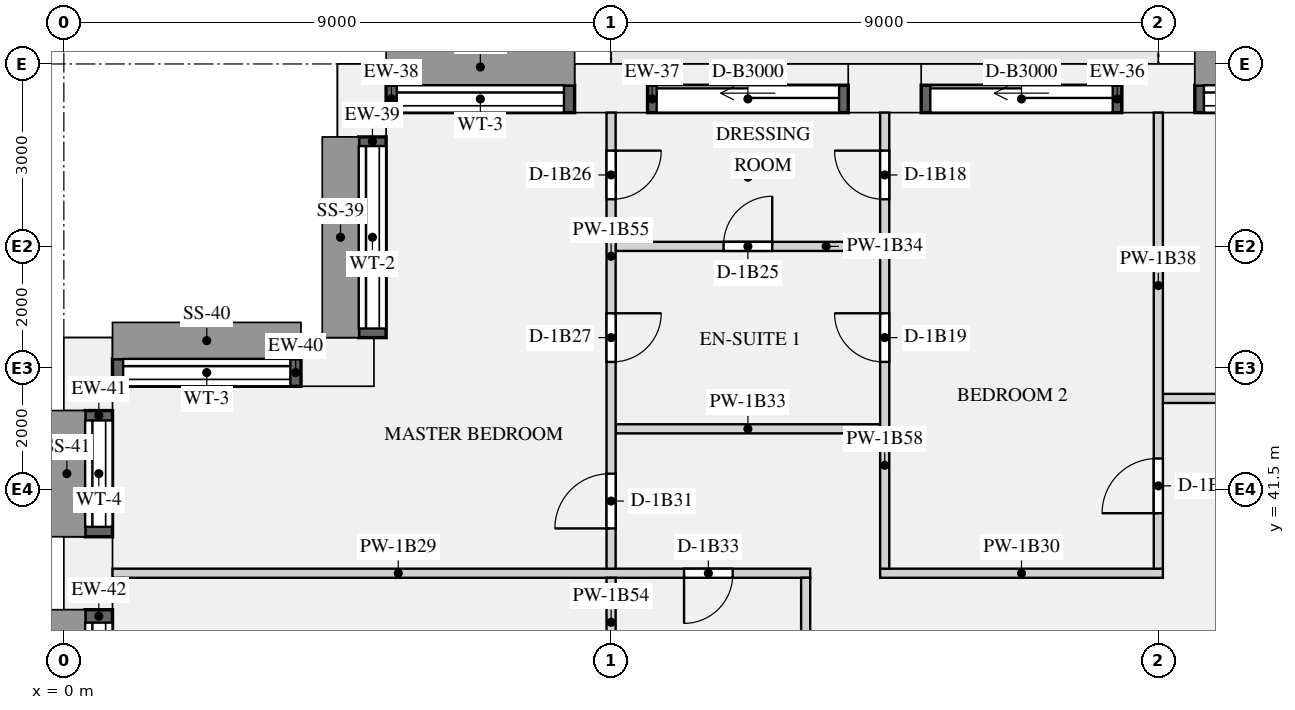
"""IFC4 building model, lengths in metres.
Left out: names, types, materials, properties, quantities, classifications, styles, units other than length and angle.
Written with IfcOpenShell. Run it as: python <this file> out.ifc"""

import sys

from ifc_helpers import new_model, si_unit, direction, frame, frame_2d, origin, origin_2d, place, context, subcontext, project, spatial, rectangle, extrude, element, fill, save


model = new_model("IFC4")
c1 = context("Model", 3, precision=1e-05, world=origin(), true_north=direction((0.0, 1.0)))
c2 = subcontext(c1, "Body", "Model", "MODEL_VIEW")
j1 = project(units=[si_unit("LENGTHUNIT", "METRE"), si_unit("PLANEANGLEUNIT", "RADIAN")], contexts=[c1])
p1 = place(None, origin())
s1 = spatial("IfcSite", under=j1, at=p1, CompositionType="ELEMENT")
p2 = place(p1, origin())
s2 = spatial("IfcBuilding", under=s1, at=p2, CompositionType="ELEMENT")
p3 = place(p2, frame((0.0, 0.0, 28.95)))
s3 = spatial("IfcBuildingStorey", under=s2, at=p3, CompositionType="ELEMENT", Elevation=28.95)
for number, where, z_axis, x_axis in (
    (1, (18.0, 48.1, 0.0), (0.0, 0.0, 1.0), (-1.0, 0.0, 0.0)),
    (2, (13.5, 48.1, 0.0), (0.0, 0.0, 1.0), (-1.0, 0.0, 0.0)),
    (3, (9.0, 48.1, 0.0), (0.0, 0.0, 1.0), (-1.0, 0.0, 0.0)),
    (4, (4.9, 47.9, 0.0), (0.0, 0.0, 1.0), (0.0, -1.0, 0.0)),
    (5, (4.5, 43.6, 0.0), (0.0, 0.0, 1.0), (-1.0, 0.0, 0.0)),
    (6, (0.4, 43.4, 0.0), (0.0, 0.0, 1.0), (0.0, -1.0, 0.0)),
    (7, (0.4, 40.125, 0.0), (0.0, 0.0, 1.0), (0.0, -1.0, 0.0)),
):
    element("IfcColumn", number, at=place(p3, frame(where, z_axis=z_axis, x_axis=x_axis)), inside=s3, PredefinedType="USERDEFINED", context=c2, shape_type="SweptSolid", body=[
        extrude(rectangle(XDim=1.2, YDim=0.8, at=origin_2d()), origin(), (0.0, 0.0, 1.0), 3.15),
    ])
p4 = place(p3, frame((21.9, 47.925, 0.9), z_axis=(0.0, 0.0, 1.0), x_axis=(-1.0, 0.0, 0.0)))
e8 = element("IfcWall", 8, at=p4, inside=s3, PredefinedType="SOLIDWALL", context=c2, shape_type="SweptSolid", body=[
    extrude(rectangle(XDim=3.3, YDim=0.45, at=frame_2d((1.65, 0.0))), origin(), (0.0, 0.0, 1.0), 1.93),
])
p5 = place(p4, frame((0.15, 0.0, 0.15)))
e9 = element("IfcOpeningElement", 9, at=p5, cuts=e8, PredefinedType="OPENING", context=c2, shape_type="SweptSolid", body=[
    extrude(rectangle(XDim=3.0, YDim=1.5, at=frame_2d((1.5, 0.75))), frame((0.0, 0.235, 0.0), z_axis=(0.0, -1.0, 0.0), x_axis=(1.0, 0.0, 0.0)), (0.0, 0.0, 1.0), 0.47),
])
p6 = place(p3, frame((17.4, 47.925, 0.0), z_axis=(0.0, 0.0, 1.0), x_axis=(-1.0, 0.0, 0.0)))
e10 = element("IfcWall", 10, at=p6, inside=s3, PredefinedType="SOLIDWALL", context=c2, shape_type="SweptSolid", body=[
    extrude(rectangle(XDim=3.3, YDim=0.45, at=frame_2d((1.65, 0.0))), origin(), (0.0, 0.0, 1.0), 2.83),
])
p7 = place(p6, frame((0.15, 0.0, 0.0)))
e11 = element("IfcOpeningElement", 11, at=p7, cuts=e10, PredefinedType="OPENING", context=c2, shape_type="SweptSolid", body=[
    extrude(rectangle(XDim=3.0, YDim=2.3, at=frame_2d((1.5, 1.15))), frame((0.0, 0.235, 0.0), z_axis=(0.0, -1.0, 0.0), x_axis=(1.0, 0.0, 0.0)), (0.0, 0.0, 1.0), 0.47),
])
p8 = place(p3, frame((12.9, 47.925, 0.0), z_axis=(0.0, 0.0, 1.0), x_axis=(-1.0, 0.0, 0.0)))
e12 = element("IfcWall", 12, at=p8, inside=s3, PredefinedType="SOLIDWALL", context=c2, shape_type="SweptSolid", body=[
    extrude(rectangle(XDim=3.3, YDim=0.45, at=frame_2d((1.65, 0.0))), origin(), (0.0, 0.0, 1.0), 2.83),
])
p9 = place(p8, frame((0.15, 0.0, 0.0)))
e13 = element("IfcOpeningElement", 13, at=p9, cuts=e12, PredefinedType="OPENING", context=c2, shape_type="SweptSolid", body=[
    extrude(rectangle(XDim=3.0, YDim=2.3, at=frame_2d((1.5, 1.15))), frame((0.0, 0.235, 0.0), z_axis=(0.0, -1.0, 0.0), x_axis=(1.0, 0.0, 0.0)), (0.0, 0.0, 1.0), 0.47),
])
p10 = place(p3, frame((8.4, 47.925, 0.9), z_axis=(0.0, 0.0, 1.0), x_axis=(-1.0, 0.0, 0.0)))
e14 = element("IfcWall", 14, at=p10, inside=s3, PredefinedType="SOLIDWALL", context=c2, shape_type="SweptSolid", body=[
    extrude(rectangle(XDim=3.1, YDim=0.45, at=frame_2d((1.55, 0.0))), origin(), (0.0, 0.0, 1.0), 1.93),
])
p11 = place(p10, frame((0.175, 0.0, 0.15)))
e15 = element("IfcOpeningElement", 15, at=p11, cuts=e14, PredefinedType="OPENING", context=c2, shape_type="SweptSolid", body=[
    extrude(rectangle(XDim=2.75, YDim=1.5, at=frame_2d((1.375, 0.75))), frame((0.0, 0.235, 0.0), z_axis=(0.0, -1.0, 0.0), x_axis=(1.0, 0.0, 0.0)), (0.0, 0.0, 1.0), 0.47),
])
p12 = place(p3, frame((5.075, 47.3, 0.9), z_axis=(0.0, 0.0, 1.0), x_axis=(0.0, -1.0, 0.0)))
e16 = element("IfcWall", 16, at=p12, inside=s3, PredefinedType="SOLIDWALL", context=c2, shape_type="SweptSolid", body=[
    extrude(rectangle(XDim=3.3, YDim=0.45, at=frame_2d((1.65, 0.0))), origin(), (0.0, 0.0, 1.0), 1.93),
])
p13 = place(p12, frame((0.15, 0.0, 0.15)))
e17 = element("IfcOpeningElement", 17, at=p13, cuts=e16, PredefinedType="OPENING", context=c2, shape_type="SweptSolid", body=[
    extrude(rectangle(XDim=3.0, YDim=1.5, at=frame_2d((1.5, 0.75))), frame((0.0, 0.235, 0.0), z_axis=(0.0, -1.0, 0.0), x_axis=(1.0, 0.0, 0.0)), (0.0, 0.0, 1.0), 0.47),
])
p14 = place(p3, frame((3.9, 43.425, 0.9), z_axis=(0.0, 0.0, 1.0), x_axis=(-1.0, 0.0, 0.0)))
e18 = element("IfcWall", 18, at=p14, inside=s3, PredefinedType="SOLIDWALL", context=c2, shape_type="SweptSolid", body=[
    extrude(rectangle(XDim=3.1, YDim=0.45, at=frame_2d((1.55, 0.0))), origin(), (0.0, 0.0, 1.0), 1.93),
])
p15 = place(p14, frame((0.175, 0.0, 0.15)))
e19 = element("IfcOpeningElement", 19, at=p15, cuts=e18, PredefinedType="OPENING", context=c2, shape_type="SweptSolid", body=[
    extrude(rectangle(XDim=2.75, YDim=1.5, at=frame_2d((1.375, 0.75))), frame((0.0, 0.235, 0.0), z_axis=(0.0, -1.0, 0.0), x_axis=(1.0, 0.0, 0.0)), (0.0, 0.0, 1.0), 0.47),
])
p16 = place(p3, frame((0.575, 42.8, 0.9), z_axis=(0.0, 0.0, 1.0), x_axis=(0.0, -1.0, 0.0)))
e20 = element("IfcWall", 20, at=p16, inside=s3, PredefinedType="SOLIDWALL", context=c2, shape_type="SweptSolid", body=[
    extrude(rectangle(XDim=2.075, YDim=0.45, at=frame_2d((1.038, 0.0))), origin(), (0.0, 0.0, 1.0), 1.93),
])
p17 = place(p16, frame((0.163, 0.0, 0.15)))
e21 = element("IfcOpeningElement", 21, at=p17, cuts=e20, PredefinedType="OPENING", context=c2, shape_type="SweptSolid", body=[
    extrude(rectangle(XDim=1.75, YDim=1.5, at=frame_2d((0.875, 0.75))), frame((0.0, 0.235, 0.0), z_axis=(0.0, -1.0, 0.0), x_axis=(1.0, 0.0, 0.0)), (0.0, 0.0, 1.0), 0.47),
])
p18 = place(p3, frame((0.575, 39.525, 0.9), z_axis=(0.0, 0.0, 1.0), x_axis=(0.0, -1.0, 0.0)))
e22 = element("IfcWall", 22, at=p18, inside=s3, PredefinedType="SOLIDWALL", context=c2, shape_type="SweptSolid", body=[
    extrude(rectangle(XDim=2.675, YDim=0.45, at=frame_2d((1.337, 0.0))), origin(), (0.0, 0.0, 1.0), 1.93),
])
p19 = place(p18, frame((0.212, 0.0, 0.15)))
e23 = element("IfcOpeningElement", 23, at=p19, cuts=e22, PredefinedType="OPENING", context=c2, shape_type="SweptSolid", body=[
    extrude(rectangle(XDim=2.25, YDim=1.5, at=frame_2d((1.125, 0.75))), frame((0.0, 0.235, 0.0), z_axis=(0.0, -1.0, 0.0), x_axis=(1.0, 0.0, 0.0)), (0.0, 0.0, 1.0), 0.47),
])
p20 = place(p3, frame((18.075, 43.0, 0.0), z_axis=(0.0, 0.0, 1.0), x_axis=(1.0, 0.0, 0.0)))
e24 = element("IfcWall", 24, at=p20, inside=s3, PredefinedType="PARTITIONING", context=c2, shape_type="SweptSolid", body=[
    extrude(rectangle(XDim=31.35, YDim=0.15, at=frame_2d((15.675, 0.0))), origin(), (0.0, 0.0, 1.0), 2.83),
])
p21 = place(p20, frame((17.175, 0.0, 0.0)))
e25 = element("IfcOpeningElement", 25, at=p21, cuts=e24, PredefinedType="OPENING", context=c2, shape_type="SweptSolid", body=[
    extrude(rectangle(XDim=1.5, YDim=2.1, at=frame_2d((0.75, 1.05))), frame((0.0, 0.085, 0.0), z_axis=(0.0, -1.0, 0.0), x_axis=(1.0, 0.0, 0.0)), (0.0, 0.0, 1.0), 0.17),
])
p22 = place(p20, frame((11.475, 0.0, 0.0)))
e26 = element("IfcOpeningElement", 26, at=p22, cuts=e24, PredefinedType="OPENING", context=c2, shape_type="SweptSolid", body=[
    extrude(rectangle(XDim=0.9, YDim=2.1, at=frame_2d((0.45, 1.05))), frame((0.0, 0.085, 0.0), z_axis=(0.0, -1.0, 0.0), x_axis=(1.0, 0.0, 0.0)), (0.0, 0.0, 1.0), 0.17),
])
p23 = place(p20, frame((2.475, 0.0, 0.0)))
e27 = element("IfcOpeningElement", 27, at=p23, cuts=e24, PredefinedType="OPENING", context=c2, shape_type="SweptSolid", body=[
    extrude(rectangle(XDim=0.9, YDim=2.1, at=frame_2d((0.45, 1.05))), frame((0.0, 0.085, 0.0), z_axis=(0.0, -1.0, 0.0), x_axis=(1.0, 0.0, 0.0)), (0.0, 0.0, 1.0), 0.17),
])
p24 = place(p20, frame((24.225, 0.0, 0.0)))
e28 = element("IfcOpeningElement", 28, at=p24, cuts=e24, PredefinedType="OPENING", context=c2, shape_type="SweptSolid", body=[
    extrude(rectangle(XDim=0.9, YDim=2.1, at=frame_2d((0.45, 1.05))), frame((0.0, 0.085, 0.0), z_axis=(0.0, -1.0, 0.0), x_axis=(1.0, 0.0, 0.0)), (0.0, 0.0, 1.0), 0.17),
])
p25 = place(p20, frame((28.725, 0.0, 0.0)))
e29 = element("IfcOpeningElement", 29, at=p25, cuts=e24, PredefinedType="OPENING", context=c2, shape_type="SweptSolid", body=[
    extrude(rectangle(XDim=0.9, YDim=2.1, at=frame_2d((0.45, 1.05))), frame((0.0, 0.085, 0.0), z_axis=(0.0, -1.0, 0.0), x_axis=(1.0, 0.0, 0.0)), (0.0, 0.0, 1.0), 0.17),
])
p26 = place(p3, frame((0.8, 40.125, 0.0), z_axis=(0.0, 0.0, 1.0), x_axis=(1.0, 0.0, 0.0)))
e30 = element("IfcWall", 30, at=p26, inside=s3, PredefinedType="PARTITIONING", context=c2, shape_type="SweptSolid", body=[
    extrude(rectangle(XDim=11.475, YDim=0.15, at=frame_2d((5.737, 0.0))), origin(), (0.0, 0.0, 1.0), 2.83),
])
p27 = place(p26, frame((9.4, 0.0, 0.0)))
e31 = element("IfcOpeningElement", 31, at=p27, cuts=e30, PredefinedType="OPENING", context=c2, shape_type="SweptSolid", body=[
    extrude(rectangle(XDim=0.8, YDim=2.1, at=frame_2d((0.4, 1.05))), frame((0.0, 0.085, 0.0), z_axis=(0.0, -1.0, 0.0), x_axis=(1.0, 0.0, 0.0)), (0.0, 0.0, 1.0), 0.17),
])
p28 = place(p3, frame((13.425, 40.125, 0.0), z_axis=(0.0, 0.0, 1.0), x_axis=(1.0, 0.0, 0.0)))
e32 = element("IfcWall", 32, at=p28, inside=s3, PredefinedType="PARTITIONING", context=c2, shape_type="SweptSolid", body=[
    extrude(rectangle(XDim=4.65, YDim=0.15, at=frame_2d((2.325, 0.0))), origin(), (0.0, 0.0, 1.0), 2.83),
])
p29 = place(p3, frame((9.075, 42.5, 0.0), z_axis=(0.0, 0.0, 1.0), x_axis=(1.0, 0.0, 0.0)))
e33 = element("IfcWall", 33, at=p29, inside=s3, PredefinedType="PARTITIONING", context=c2, shape_type="SweptSolid", body=[
    extrude(rectangle(XDim=4.35, YDim=0.15, at=frame_2d((2.175, 0.0))), origin(), (0.0, 0.0, 1.0), 2.83),
])
p30 = place(p3, frame((9.075, 45.5, 0.0), z_axis=(0.0, 0.0, 1.0), x_axis=(1.0, 0.0, 0.0)))
e34 = element("IfcWall", 34, at=p30, inside=s3, PredefinedType="PARTITIONING", context=c2, shape_type="SweptSolid", body=[
    extrude(rectangle(XDim=4.35, YDim=0.15, at=frame_2d((2.175, 0.0))), origin(), (0.0, 0.0, 1.0), 2.83),
])
p31 = place(p30, frame((1.775, 0.0, 0.0)))
e35 = element("IfcOpeningElement", 35, at=p31, cuts=e34, PredefinedType="OPENING", context=c2, shape_type="SweptSolid", body=[
    extrude(rectangle(XDim=0.8, YDim=2.1, at=frame_2d((0.4, 1.05))), frame((0.0, 0.085, 0.0), z_axis=(0.0, -1.0, 0.0), x_axis=(1.0, 0.0, 0.0)), (0.0, 0.0, 1.0), 0.17),
])
p32 = place(p3, frame((18.0, 40.2, 0.0), z_axis=(0.0, 0.0, 1.0), x_axis=(0.0, 1.0, 0.0)))
e36 = element("IfcWall", 36, at=p32, inside=s3, PredefinedType="PARTITIONING", context=c2, shape_type="SweptSolid", body=[
    extrude(rectangle(XDim=7.5, YDim=0.15, at=frame_2d((3.75, 0.0))), origin(), (0.0, 0.0, 1.0), 2.83),
])
p33 = place(p32, frame((0.912, 0.0, 0.0)))
e37 = element("IfcOpeningElement", 37, at=p33, cuts=e36, PredefinedType="OPENING", context=c2, shape_type="SweptSolid", body=[
    extrude(rectangle(XDim=0.9, YDim=2.1, at=frame_2d((0.45, 1.05))), frame((0.0, 0.085, 0.0), z_axis=(0.0, -1.0, 0.0), x_axis=(1.0, 0.0, 0.0)), (0.0, 0.0, 1.0), 0.17),
])
p34 = place(p3, frame((9.0, 36.35, 0.0), z_axis=(0.0, 0.0, 1.0), x_axis=(0.0, 1.0, 0.0)))
e38 = element("IfcWall", 38, at=p34, inside=s3, PredefinedType="PARTITIONING", context=c2, shape_type="SweptSolid", body=[
    extrude(rectangle(XDim=3.7, YDim=0.15, at=frame_2d((1.85, 0.0))), origin(), (0.0, 0.0, 1.0), 2.83),
])
p35 = place(p34, frame((1.438, 0.0, 0.0)))
e39 = element("IfcOpeningElement", 39, at=p35, cuts=e38, PredefinedType="OPENING", context=c2, shape_type="SweptSolid", body=[
    extrude(rectangle(XDim=0.8, YDim=2.1, at=frame_2d((0.4, 1.05))), frame((0.0, 0.085, 0.0), z_axis=(0.0, -1.0, 0.0), x_axis=(1.0, 0.0, 0.0)), (0.0, 0.0, 1.0), 0.17),
])
p36 = place(p3, frame((9.0, 40.2, 0.0), z_axis=(0.0, 0.0, 1.0), x_axis=(0.0, 1.0, 0.0)))
e40 = element("IfcWall", 40, at=p36, inside=s3, PredefinedType="PARTITIONING", context=c2, shape_type="SweptSolid", body=[
    extrude(rectangle(XDim=7.5, YDim=0.15, at=frame_2d((3.75, 0.0))), origin(), (0.0, 0.0, 1.0), 2.83),
])
p37 = place(p36, frame((6.075, 0.0, 0.0)))
e41 = element("IfcOpeningElement", 41, at=p37, cuts=e40, PredefinedType="OPENING", context=c2, shape_type="SweptSolid", body=[
    extrude(rectangle(XDim=0.8, YDim=2.1, at=frame_2d((0.4, 1.05))), frame((0.0, 0.085, 0.0), z_axis=(0.0, -1.0, 0.0), x_axis=(1.0, 0.0, 0.0)), (0.0, 0.0, 1.0), 0.17),
])
p38 = place(p36, frame((3.4, 0.0, 0.0)))
e42 = element("IfcOpeningElement", 42, at=p38, cuts=e40, PredefinedType="OPENING", context=c2, shape_type="SweptSolid", body=[
    extrude(rectangle(XDim=0.8, YDim=2.1, at=frame_2d((0.4, 1.05))), frame((0.0, 0.085, 0.0), z_axis=(0.0, -1.0, 0.0), x_axis=(1.0, 0.0, 0.0)), (0.0, 0.0, 1.0), 0.17),
])
p39 = place(p36, frame((0.662, 0.0, 0.0)))
e43 = element("IfcOpeningElement", 43, at=p39, cuts=e40, PredefinedType="OPENING", context=c2, shape_type="SweptSolid", body=[
    extrude(rectangle(XDim=0.9, YDim=2.1, at=frame_2d((0.45, 1.05))), frame((0.0, 0.085, 0.0), z_axis=(0.0, -1.0, 0.0), x_axis=(1.0, 0.0, 0.0)), (0.0, 0.0, 1.0), 0.17),
])
p40 = place(p3, frame((13.5, 40.2, 0.0), z_axis=(0.0, 0.0, 1.0), x_axis=(0.0, 1.0, 0.0)))
e44 = element("IfcWall", 44, at=p40, inside=s3, PredefinedType="PARTITIONING", context=c2, shape_type="SweptSolid", body=[
    extrude(rectangle(XDim=7.5, YDim=0.15, at=frame_2d((3.75, 0.0))), origin(), (0.0, 0.0, 1.0), 2.83),
])
p41 = place(p40, frame((6.075, 0.0, 0.0)))
e45 = element("IfcOpeningElement", 45, at=p41, cuts=e44, PredefinedType="OPENING", context=c2, shape_type="SweptSolid", body=[
    extrude(rectangle(XDim=0.8, YDim=2.1, at=frame_2d((0.4, 1.05))), frame((0.0, 0.085, 0.0), z_axis=(0.0, -1.0, 0.0), x_axis=(1.0, 0.0, 0.0)), (0.0, 0.0, 1.0), 0.17),
])
p42 = place(p40, frame((3.4, 0.0, 0.0)))
e46 = element("IfcOpeningElement", 46, at=p42, cuts=e44, PredefinedType="OPENING", context=c2, shape_type="SweptSolid", body=[
    extrude(rectangle(XDim=0.8, YDim=2.1, at=frame_2d((0.4, 1.05))), frame((0.0, 0.085, 0.0), z_axis=(0.0, -1.0, 0.0), x_axis=(1.0, 0.0, 0.0)), (0.0, 0.0, 1.0), 0.17),
])
p43 = place(p3, frame((12.2, 36.35, 0.0), z_axis=(0.0, 0.0, 1.0), x_axis=(0.0, 1.0, 0.0)))
e47 = element("IfcWall", 47, at=p43, inside=s3, PredefinedType="PARTITIONING", context=c2, shape_type="SweptSolid", body=[
    extrude(rectangle(XDim=3.7, YDim=0.15, at=frame_2d((1.85, 0.0))), origin(), (0.0, 0.0, 1.0), 2.83),
])
p44 = place(p5, origin())
e48 = element("IfcWindow", 48, at=p44, inside=s3, PartitioningType="SINGLE_PANEL", PredefinedType="WINDOW", context=c2, shape_type="SweptSolid", body=[
    extrude(rectangle(XDim=3.0, YDim=1.5, at=frame_2d((1.5, 0.75))), frame((0.0, -0.065, 0.0), z_axis=(0.0, -1.0, 0.0), x_axis=(1.0, 0.0, 0.0)), (0.0, 0.0, 1.0), 0.06),
])
fill(e9, e48)
p45 = place(p7, origin())
e49 = element("IfcDoor", 49, at=p45, inside=s3, OperationType="SLIDING_TO_LEFT", PredefinedType="DOOR", context=c2, shape_type="SweptSolid", body=[
    extrude(rectangle(XDim=3.0, YDim=2.3, at=frame_2d((1.5, 1.15))), frame((0.0, -0.07, 0.0), z_axis=(0.0, -1.0, 0.0), x_axis=(1.0, 0.0, 0.0)), (0.0, 0.0, 1.0), 0.05),
])
fill(e11, e49)
p46 = place(p9, origin())
e50 = element("IfcDoor", 50, at=p46, inside=s3, OperationType="SLIDING_TO_LEFT", PredefinedType="DOOR", context=c2, shape_type="SweptSolid", body=[
    extrude(rectangle(XDim=3.0, YDim=2.3, at=frame_2d((1.5, 1.15))), frame((0.0, -0.07, 0.0), z_axis=(0.0, -1.0, 0.0), x_axis=(1.0, 0.0, 0.0)), (0.0, 0.0, 1.0), 0.05),
])
fill(e13, e50)
p47 = place(p11, origin())
e51 = element("IfcWindow", 51, at=p47, inside=s3, PartitioningType="SINGLE_PANEL", PredefinedType="WINDOW", context=c2, shape_type="SweptSolid", body=[
    extrude(rectangle(XDim=2.75, YDim=1.5, at=frame_2d((1.375, 0.75))), frame((0.0, -0.065, 0.0), z_axis=(0.0, -1.0, 0.0), x_axis=(1.0, 0.0, 0.0)), (0.0, 0.0, 1.0), 0.06),
])
fill(e15, e51)
p48 = place(p13, origin())
e52 = element("IfcWindow", 52, at=p48, inside=s3, PartitioningType="SINGLE_PANEL", PredefinedType="WINDOW", context=c2, shape_type="SweptSolid", body=[
    extrude(rectangle(XDim=3.0, YDim=1.5, at=frame_2d((1.5, 0.75))), frame((0.0, -0.065, 0.0), z_axis=(0.0, -1.0, 0.0), x_axis=(1.0, 0.0, 0.0)), (0.0, 0.0, 1.0), 0.06),
])
fill(e17, e52)
p49 = place(p15, origin())
e53 = element("IfcWindow", 53, at=p49, inside=s3, PartitioningType="SINGLE_PANEL", PredefinedType="WINDOW", context=c2, shape_type="SweptSolid", body=[
    extrude(rectangle(XDim=2.75, YDim=1.5, at=frame_2d((1.375, 0.75))), frame((0.0, -0.065, 0.0), z_axis=(0.0, -1.0, 0.0), x_axis=(1.0, 0.0, 0.0)), (0.0, 0.0, 1.0), 0.06),
])
fill(e19, e53)
p50 = place(p17, origin())
e54 = element("IfcWindow", 54, at=p50, inside=s3, PartitioningType="SINGLE_PANEL", PredefinedType="WINDOW", context=c2, shape_type="SweptSolid", body=[
    extrude(rectangle(XDim=1.75, YDim=1.5, at=frame_2d((0.875, 0.75))), frame((0.0, -0.065, 0.0), z_axis=(0.0, -1.0, 0.0), x_axis=(1.0, 0.0, 0.0)), (0.0, 0.0, 1.0), 0.06),
])
fill(e21, e54)
p51 = place(p19, origin())
e55 = element("IfcWindow", 55, at=p51, inside=s3, PartitioningType="SINGLE_PANEL", PredefinedType="WINDOW", context=c2, shape_type="SweptSolid", body=[
    extrude(rectangle(XDim=2.25, YDim=1.5, at=frame_2d((1.125, 0.75))), frame((0.0, -0.065, 0.0), z_axis=(0.0, -1.0, 0.0), x_axis=(1.0, 0.0, 0.0)), (0.0, 0.0, 1.0), 0.06),
])
fill(e23, e55)
p52 = place(p41, origin())
e56 = element("IfcDoor", 56, at=p52, inside=s3, OperationType="SINGLE_SWING_RIGHT", PredefinedType="DOOR", context=c2, shape_type="SweptSolid", body=[
    extrude(rectangle(XDim=0.8, YDim=2.1, at=frame_2d((0.4, 1.05))), frame((0.0, 0.025, 0.0), z_axis=(0.0, -1.0, 0.0), x_axis=(1.0, 0.0, 0.0)), (0.0, 0.0, 1.0), 0.05),
])
fill(e45, e56)
p53 = place(p42, origin())
e57 = element("IfcDoor", 57, at=p53, inside=s3, OperationType="SINGLE_SWING_RIGHT", PredefinedType="DOOR", context=c2, shape_type="SweptSolid", body=[
    extrude(rectangle(XDim=0.8, YDim=2.1, at=frame_2d((0.4, 1.05))), frame((0.0, 0.025, 0.0), z_axis=(0.0, -1.0, 0.0), x_axis=(1.0, 0.0, 0.0)), (0.0, 0.0, 1.0), 0.05),
])
fill(e46, e57)
p54 = place(p33, origin())
e58 = element("IfcDoor", 58, at=p54, inside=s3, OperationType="SINGLE_SWING_LEFT", PredefinedType="DOOR", context=c2, shape_type="SweptSolid", body=[
    extrude(rectangle(XDim=0.9, YDim=2.1, at=frame_2d((0.45, 1.05))), frame((0.0, 0.025, 0.0), z_axis=(0.0, -1.0, 0.0), x_axis=(1.0, 0.0, 0.0)), (0.0, 0.0, 1.0), 0.05),
])
fill(e37, e58)
p55 = place(p31, origin())
e59 = element("IfcDoor", 59, at=p55, inside=s3, OperationType="SINGLE_SWING_RIGHT", PredefinedType="DOOR", context=c2, shape_type="SweptSolid", body=[
    extrude(rectangle(XDim=0.8, YDim=2.1, at=frame_2d((0.4, 1.05))), frame((0.0, 0.025, 0.0), z_axis=(0.0, -1.0, 0.0), x_axis=(1.0, 0.0, 0.0)), (0.0, 0.0, 1.0), 0.05),
])
fill(e35, e59)
p56 = place(p37, frame((0.8, 0.0, 0.0), z_axis=(0.0, 0.0, 1.0), x_axis=(-1.0, 0.0, 0.0)))
e60 = element("IfcDoor", 60, at=p56, inside=s3, OperationType="SINGLE_SWING_LEFT", PredefinedType="DOOR", context=c2, shape_type="SweptSolid", body=[
    extrude(rectangle(XDim=0.8, YDim=2.1, at=frame_2d((0.4, 1.05))), frame((0.0, 0.025, 0.0), z_axis=(0.0, -1.0, 0.0), x_axis=(1.0, 0.0, 0.0)), (0.0, 0.0, 1.0), 0.05),
])
fill(e41, e60)
p57 = place(p38, frame((0.8, 0.0, 0.0), z_axis=(0.0, 0.0, 1.0), x_axis=(-1.0, 0.0, 0.0)))
e61 = element("IfcDoor", 61, at=p57, inside=s3, OperationType="SINGLE_SWING_LEFT", PredefinedType="DOOR", context=c2, shape_type="SweptSolid", body=[
    extrude(rectangle(XDim=0.8, YDim=2.1, at=frame_2d((0.4, 1.05))), frame((0.0, 0.025, 0.0), z_axis=(0.0, -1.0, 0.0), x_axis=(1.0, 0.0, 0.0)), (0.0, 0.0, 1.0), 0.05),
])
fill(e42, e61)
p58 = place(p39, origin())
e62 = element("IfcDoor", 62, at=p58, inside=s3, OperationType="SINGLE_SWING_LEFT", PredefinedType="DOOR", context=c2, shape_type="SweptSolid", body=[
    extrude(rectangle(XDim=0.9, YDim=2.1, at=frame_2d((0.45, 1.05))), frame((0.0, 0.025, 0.0), z_axis=(0.0, -1.0, 0.0), x_axis=(1.0, 0.0, 0.0)), (0.0, 0.0, 1.0), 0.05),
])
fill(e43, e62)
p59 = place(p27, frame((0.8, 0.0, 0.0), z_axis=(0.0, 0.0, 1.0), x_axis=(-1.0, 0.0, 0.0)))
e63 = element("IfcDoor", 63, at=p59, inside=s3, OperationType="SINGLE_SWING_RIGHT", PredefinedType="DOOR", context=c2, shape_type="SweptSolid", body=[
    extrude(rectangle(XDim=0.8, YDim=2.1, at=frame_2d((0.4, 1.05))), frame((0.0, 0.025, 0.0), z_axis=(0.0, -1.0, 0.0), x_axis=(1.0, 0.0, 0.0)), (0.0, 0.0, 1.0), 0.05),
])
fill(e31, e63)
save(model, sys.argv[1])
